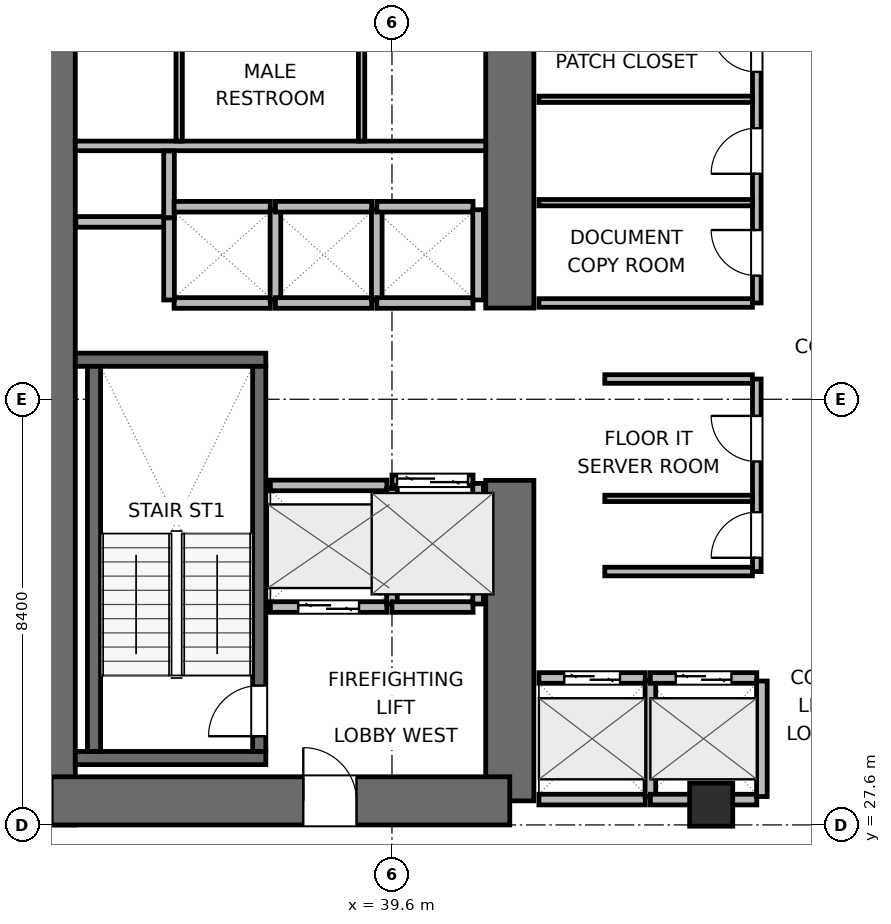
"""IFC4 building model, lengths in metres.
Left out: names, types, materials, properties, quantities, classifications, styles, units other than length and angle.
Written with IfcOpenShell. Run it as: python <this file> out.ifc"""

import sys

from ifc_helpers import new_model, si_unit, direction, frame, frame_2d, origin, origin_2d, place, context, subcontext, project, spatial, rectangle, extrude, element, fill, save


model = new_model("IFC4")
c1 = context("Model", 3, precision=1e-05, world=origin(), true_north=direction((0.0, 1.0)))
c2 = subcontext(c1, "Body", "Model", "MODEL_VIEW")
j1 = project(units=[si_unit("LENGTHUNIT", "METRE"), si_unit("PLANEANGLEUNIT", "RADIAN")], contexts=[c1])
p1 = place(None, origin())
s1 = spatial("IfcSite", under=j1, at=p1, CompositionType="ELEMENT")
p2 = place(p1, origin())
s2 = spatial("IfcBuilding", under=s1, at=p2, CompositionType="ELEMENT")
p3 = place(p2, frame((0.0, 0.0, 41.1)))
s3 = spatial("IfcBuildingStorey", under=s2, at=p3, CompositionType="ELEMENT", Elevation=41.1)
p4 = place(p3, frame((32.875, 27.6, 0.0), z_axis=(0.0, 0.0, 1.0), x_axis=(0.0, 1.0, 0.0)))
e1 = element("IfcWall", 1, at=p4, inside=s3, PredefinedType="SHEAR", context=c2, shape_type="SweptSolid", body=[
    extrude(rectangle(XDim=16.8, YDim=0.95, at=frame_2d((8.4, 0.0))), origin(), (0.0, 0.0, 1.0), 3.9),
])
p5 = place(p3, frame((41.925, 28.075, 0.0), z_axis=(0.0, 0.0, 1.0), x_axis=(0.0, 1.0, 0.0)))
e2 = element("IfcWall", 2, at=p5, inside=s3, PredefinedType="SHEAR", context=c2, shape_type="SweptSolid", body=[
    extrude(rectangle(XDim=6.325, YDim=0.95, at=frame_2d((3.163, 0.0))), origin(), (0.0, 0.0, 1.0), 3.9),
])
p6 = place(p3, frame((41.925, 37.8, 0.0), z_axis=(0.0, 0.0, 1.0), x_axis=(0.0, 1.0, 0.0)))
e3 = element("IfcWall", 3, at=p6, inside=s3, PredefinedType="SHEAR", context=c2, shape_type="SweptSolid", body=[
    extrude(rectangle(XDim=6.125, YDim=0.95, at=frame_2d((3.062, 0.0))), origin(), (0.0, 0.0, 1.0), 3.9),
])
p7 = place(p3, frame((32.875, 28.075, 0.0), z_axis=(0.0, 0.0, 1.0), x_axis=(1.0, 0.0, 0.0)))
e4 = element("IfcWall", 4, at=p7, inside=s3, PredefinedType="SHEAR", context=c2, shape_type="SweptSolid", body=[
    extrude(rectangle(XDim=9.05, YDim=0.95, at=frame_2d((4.525, 0.0))), origin(), (0.0, 0.0, 1.0), 3.9),
])
p8 = place(p7, frame((4.975, 0.0, 0.0)))
e5 = element("IfcOpeningElement", 5, at=p8, cuts=e4, PredefinedType="OPENING", context=c2, shape_type="SweptSolid", body=[
    extrude(rectangle(XDim=1.05, YDim=2.04, at=frame_2d((0.525, 1.02))), frame((0.0, 0.485, 0.0), z_axis=(0.0, -1.0, 0.0), x_axis=(1.0, 0.0, 0.0)), (0.0, 0.0, 1.0), 0.97),
])
for number, where, z_axis, x_axis in (
    (6, (33.35, 28.92, 0.0), (0.0, 0.0, 1.0), (1.0, 0.0, 0.0)),
    (7, (33.35, 36.78, 0.0), (0.0, 0.0, 1.0), (1.0, 0.0, 0.0)),
):
    element("IfcWall", number, at=place(p3, frame(where, z_axis=z_axis, x_axis=x_axis)), inside=s3, PredefinedType="SHEAR", context=c2, shape_type="SweptSolid", body=[
        extrude(rectangle(XDim=3.76, YDim=0.26, at=frame_2d((1.88, 0.0))), origin(), (0.0, 0.0, 1.0), 3.9),
    ])
p9 = place(p3, frame((33.72, 29.05, 0.0), z_axis=(0.0, 0.0, 1.0), x_axis=(0.0, 1.0, 0.0)))
e8 = element("IfcWall", 8, at=p9, inside=s3, PredefinedType="SHEAR", context=c2, shape_type="SweptSolid", body=[
    extrude(rectangle(XDim=7.6, YDim=0.26, at=frame_2d((3.8, 0.0))), origin(), (0.0, 0.0, 1.0), 3.9),
])
p10 = place(p3, frame((36.98, 29.05, 0.0), z_axis=(0.0, 0.0, 1.0), x_axis=(0.0, 1.0, 0.0)))
e9 = element("IfcWall", 9, at=p10, inside=s3, PredefinedType="SHEAR", context=c2, shape_type="SweptSolid", body=[
    extrude(rectangle(XDim=7.6, YDim=0.26, at=frame_2d((3.8, 0.0))), origin(), (0.0, 0.0, 1.0), 3.9),
])
p11 = place(p10, frame((0.3, 0.0, 0.0)))
e10 = element("IfcOpeningElement", 10, at=p11, cuts=e9, PredefinedType="OPENING", context=c2, shape_type="SweptSolid", body=[
    extrude(rectangle(XDim=1.0, YDim=2.04, at=frame_2d((0.5, 1.02))), frame((0.0, 0.14, 0.0), z_axis=(0.0, -1.0, 0.0), x_axis=(1.0, 0.0, 0.0)), (0.0, 0.0, 1.0), 0.28),
])
p12 = place(p3, frame((45.9, 28.0, 0.0), z_axis=(0.0, 0.0, 1.0), x_axis=(1.0, 0.0, 0.0)))
e11 = element("IfcColumn", 11, at=p12, inside=s3, PredefinedType="COLUMN", context=c2, shape_type="SweptSolid", body=[
    extrude(rectangle(XDim=0.85, YDim=0.85, at=origin_2d()), origin(), (0.0, 0.0, 1.0), 3.9),
])
p13 = place(p3, frame((33.35, 41.0, 0.0), z_axis=(0.0, 0.0, 1.0), x_axis=(1.0, 0.0, 0.0)))
e12 = element("IfcWall", 12, at=p13, inside=s3, PredefinedType="PLUMBINGWALL", context=c2, shape_type="SweptSolid", body=[
    extrude(rectangle(XDim=8.1, YDim=0.19, at=frame_2d((4.05, 0.0))), origin(), (0.0, 0.0, 1.0), 3.64),
])
for number, where, z_axis, x_axis in (
    (13, (35.4, 41.095, 0.0), (0.0, 0.0, 1.0), (0.0, 1.0, 0.0)),
    (14, (39.0, 41.095, 0.0), (0.0, 0.0, 1.0), (0.0, 1.0, 0.0)),
):
    element("IfcWall", number, at=place(p3, frame(where, z_axis=z_axis, x_axis=x_axis)), inside=s3, PredefinedType="PARTITIONING", context=c2, shape_type="SweptSolid", body=[
        extrude(rectangle(XDim=2.355, YDim=0.125, at=frame_2d((1.177, 0.0))), origin(), (0.0, 0.0, 1.0), 3.64),
    ])
p14 = place(p3, frame((33.36, 39.5, 0.0), z_axis=(0.0, 0.0, 1.0), x_axis=(1.0, 0.0, 0.0)))
e15 = element("IfcWall", 15, at=p14, inside=s3, PredefinedType="PARTITIONING", context=c2, shape_type="SweptSolid", body=[
    extrude(rectangle(XDim=1.86, YDim=0.21, at=frame_2d((0.93, 0.0))), origin(), (0.0, 0.0, 1.0), 3.64),
])
p15 = place(p3, frame((35.2, 39.58, 0.0), z_axis=(0.0, 0.0, 1.0), x_axis=(0.0, 1.0, 0.0)))
e16 = element("IfcWall", 16, at=p15, inside=s3, PredefinedType="PARTITIONING", context=c2, shape_type="SweptSolid", body=[
    extrude(rectangle(XDim=1.32, YDim=0.21, at=frame_2d((0.66, 0.0))), origin(), (0.0, 0.0, 1.0), 3.64),
])
p16 = place(p3, frame((37.2, 31.9, 0.0), z_axis=(0.0, 0.0, 1.0), x_axis=(1.0, 0.0, 0.0)))
e17 = element("IfcWall", 17, at=p16, inside=s3, PredefinedType="PARTITIONING", context=c2, shape_type="SweptSolid", body=[
    extrude(rectangle(XDim=2.3, YDim=0.21, at=frame_2d((1.15, 0.0))), origin(), (0.0, 0.0, 1.0), 3.64),
])
p17 = place(p16, frame((0.55, 0.0, 0.0)))
e18 = element("IfcOpeningElement", 18, at=p17, cuts=e17, PredefinedType="OPENING", context=c2, shape_type="SweptSolid", body=[
    extrude(rectangle(XDim=1.2, YDim=2.04, at=frame_2d((0.6, 1.02))), frame((0.0, 0.115, 0.0), z_axis=(0.0, -1.0, 0.0), x_axis=(1.0, 0.0, 0.0)), (0.0, 0.0, 1.0), 0.23),
])
p18 = place(p3, frame((37.2, 34.3, 0.0), z_axis=(0.0, 0.0, 1.0), x_axis=(1.0, 0.0, 0.0)))
e19 = element("IfcWall", 19, at=p18, inside=s3, PredefinedType="PARTITIONING", context=c2, shape_type="SweptSolid", body=[
    extrude(rectangle(XDim=2.3, YDim=0.21, at=frame_2d((1.15, 0.0))), origin(), (0.0, 0.0, 1.0), 3.64),
])
p19 = place(p3, frame((39.6, 31.96, 0.0), z_axis=(0.0, 0.0, 1.0), x_axis=(0.0, 1.0, 0.0)))
e20 = element("IfcWall", 20, at=p19, inside=s3, PredefinedType="PARTITIONING", context=c2, shape_type="SweptSolid", body=[
    extrude(rectangle(XDim=2.28, YDim=0.21, at=frame_2d((1.14, 0.0))), origin(), (0.0, 0.0, 1.0), 3.64),
])
p20 = place(p3, frame((39.6, 34.4, 0.0), z_axis=(0.0, 0.0, 1.0), x_axis=(1.0, 0.0, 0.0)))
e21 = element("IfcWall", 21, at=p20, inside=s3, PredefinedType="PARTITIONING", context=c2, shape_type="SweptSolid", body=[
    extrude(rectangle(XDim=1.6, YDim=0.21, at=frame_2d((0.8, 0.0))), origin(), (0.0, 0.0, 1.0), 3.64),
])
p21 = place(p20, frame((0.1, 0.0, 0.0)))
e22 = element("IfcOpeningElement", 22, at=p21, cuts=e21, PredefinedType="OPENING", context=c2, shape_type="SweptSolid", body=[
    extrude(rectangle(XDim=1.4, YDim=2.06, at=frame_2d((0.7, 1.03))), frame((0.0, 0.115, 0.0), z_axis=(0.0, -1.0, 0.0), x_axis=(1.0, 0.0, 0.0)), (0.0, 0.0, 1.0), 0.23),
])
p22 = place(p3, frame((39.6, 31.9, 0.0), z_axis=(0.0, 0.0, 1.0), x_axis=(1.0, 0.0, 0.0)))
e23 = element("IfcWall", 23, at=p22, inside=s3, PredefinedType="PARTITIONING", context=c2, shape_type="SweptSolid", body=[
    extrude(rectangle(XDim=1.6, YDim=0.21, at=frame_2d((0.8, 0.0))), origin(), (0.0, 0.0, 1.0), 3.64),
])
p23 = place(p3, frame((41.3, 31.96, 0.0), z_axis=(0.0, 0.0, 1.0), x_axis=(0.0, 1.0, 0.0)))
e24 = element("IfcWall", 24, at=p23, inside=s3, PredefinedType="PARTITIONING", context=c2, shape_type="SweptSolid", body=[
    extrude(rectangle(XDim=2.38, YDim=0.21, at=frame_2d((1.19, 0.0))), origin(), (0.0, 0.0, 1.0), 3.64),
])
p24 = place(p3, frame((42.5, 30.5, 0.0), z_axis=(0.0, 0.0, 1.0), x_axis=(1.0, 0.0, 0.0)))
e25 = element("IfcWall", 25, at=p24, inside=s3, PredefinedType="PARTITIONING", context=c2, shape_type="SweptSolid", body=[
    extrude(rectangle(XDim=2.1, YDim=0.21, at=frame_2d((1.05, 0.0))), origin(), (0.0, 0.0, 1.0), 3.64),
])
p25 = place(p24, frame((0.5, 0.0, 0.0)))
e26 = element("IfcOpeningElement", 26, at=p25, cuts=e25, PredefinedType="OPENING", context=c2, shape_type="SweptSolid", body=[
    extrude(rectangle(XDim=1.1, YDim=2.04, at=frame_2d((0.55, 1.02))), frame((0.0, 0.115, 0.0), z_axis=(0.0, -1.0, 0.0), x_axis=(1.0, 0.0, 0.0)), (0.0, 0.0, 1.0), 0.23),
])
p26 = place(p3, frame((42.5, 28.1, 0.0), z_axis=(0.0, 0.0, 1.0), x_axis=(1.0, 0.0, 0.0)))
e27 = element("IfcWall", 27, at=p26, inside=s3, PredefinedType="PARTITIONING", context=c2, shape_type="SweptSolid", body=[
    extrude(rectangle(XDim=2.1, YDim=0.21, at=frame_2d((1.05, 0.0))), origin(), (0.0, 0.0, 1.0), 2.525),
])
p27 = place(p3, frame((44.7, 28.16, 0.0), z_axis=(0.0, 0.0, 1.0), x_axis=(0.0, 1.0, 0.0)))
e28 = element("IfcWall", 28, at=p27, inside=s3, PredefinedType="PARTITIONING", context=c2, shape_type="SweptSolid", body=[
    extrude(rectangle(XDim=2.28, YDim=0.21, at=frame_2d((1.14, 0.0))), origin(), (0.0, 0.0, 1.0), 3.64),
])
p28 = place(p3, frame((44.7, 30.5, 0.0), z_axis=(0.0, 0.0, 1.0), x_axis=(1.0, 0.0, 0.0)))
e29 = element("IfcWall", 29, at=p28, inside=s3, PredefinedType="PARTITIONING", context=c2, shape_type="SweptSolid", body=[
    extrude(rectangle(XDim=2.1, YDim=0.21, at=frame_2d((1.05, 0.0))), origin(), (0.0, 0.0, 1.0), 3.64),
])
p29 = place(p28, frame((0.5, 0.0, 0.0)))
e30 = element("IfcOpeningElement", 30, at=p29, cuts=e29, PredefinedType="OPENING", context=c2, shape_type="SweptSolid", body=[
    extrude(rectangle(XDim=1.1, YDim=2.04, at=frame_2d((0.55, 1.02))), frame((0.0, 0.115, 0.0), z_axis=(0.0, -1.0, 0.0), x_axis=(1.0, 0.0, 0.0)), (0.0, 0.0, 1.0), 0.23),
])
p30 = place(p3, frame((44.7, 28.1, 0.0), z_axis=(0.0, 0.0, 1.0), x_axis=(1.0, 0.0, 0.0)))
e31 = element("IfcWall", 31, at=p30, inside=s3, PredefinedType="PARTITIONING", context=c2, shape_type="SweptSolid", body=[
    extrude(rectangle(XDim=2.1, YDim=0.21, at=frame_2d((1.05, 0.0))), origin(), (0.0, 0.0, 1.0), 2.525),
])
p31 = place(p3, frame((46.9, 28.16, 0.0), z_axis=(0.0, 0.0, 1.0), x_axis=(0.0, 1.0, 0.0)))
e32 = element("IfcWall", 32, at=p31, inside=s3, PredefinedType="PARTITIONING", context=c2, shape_type="SweptSolid", body=[
    extrude(rectangle(XDim=2.28, YDim=0.21, at=frame_2d((1.14, 0.0))), origin(), (0.0, 0.0, 1.0), 3.64),
])
for number, where, z_axis, x_axis in (
    (33, (35.3, 37.9, 0.0), (0.0, 0.0, 1.0), (1.0, 0.0, 0.0)),
    (34, (35.3, 39.8, 0.0), (0.0, 0.0, 1.0), (1.0, 0.0, 0.0)),
):
    element("IfcWall", number, at=place(p3, frame(where, z_axis=z_axis, x_axis=x_axis)), inside=s3, PredefinedType="PARTITIONING", context=c2, shape_type="SweptSolid", body=[
        extrude(rectangle(XDim=1.9, YDim=0.21, at=frame_2d((0.95, 0.0))), origin(), (0.0, 0.0, 1.0), 3.64),
    ])
p32 = place(p3, frame((35.2, 37.96, 0.0), z_axis=(0.0, 0.0, 1.0), x_axis=(0.0, 1.0, 0.0)))
e35 = element("IfcWall", 35, at=p32, inside=s3, PredefinedType="PARTITIONING", context=c2, shape_type="SweptSolid", body=[
    extrude(rectangle(XDim=1.62, YDim=0.21, at=frame_2d((0.81, 0.0))), origin(), (0.0, 0.0, 1.0), 3.64),
])
p33 = place(p3, frame((37.3, 37.96, 0.0), z_axis=(0.0, 0.0, 1.0), x_axis=(0.0, 1.0, 0.0)))
e36 = element("IfcWall", 36, at=p33, inside=s3, PredefinedType="PARTITIONING", context=c2, shape_type="SweptSolid", body=[
    extrude(rectangle(XDim=1.78, YDim=0.21, at=frame_2d((0.89, 0.0))), origin(), (0.0, 0.0, 1.0), 3.64),
])
for number, where, z_axis, x_axis in (
    (37, (37.3, 37.9, 0.0), (0.0, 0.0, 1.0), (1.0, 0.0, 0.0)),
    (38, (37.3, 39.8, 0.0), (0.0, 0.0, 1.0), (1.0, 0.0, 0.0)),
):
    element("IfcWall", number, at=place(p3, frame(where, z_axis=z_axis, x_axis=x_axis)), inside=s3, PredefinedType="PARTITIONING", context=c2, shape_type="SweptSolid", body=[
        extrude(rectangle(XDim=1.9, YDim=0.21, at=frame_2d((0.95, 0.0))), origin(), (0.0, 0.0, 1.0), 3.64),
    ])
p34 = place(p3, frame((39.3, 37.96, 0.0), z_axis=(0.0, 0.0, 1.0), x_axis=(0.0, 1.0, 0.0)))
e39 = element("IfcWall", 39, at=p34, inside=s3, PredefinedType="PARTITIONING", context=c2, shape_type="SweptSolid", body=[
    extrude(rectangle(XDim=1.78, YDim=0.21, at=frame_2d((0.89, 0.0))), origin(), (0.0, 0.0, 1.0), 3.64),
])
for number, where, z_axis, x_axis in (
    (40, (39.3, 37.9, 0.0), (0.0, 0.0, 1.0), (1.0, 0.0, 0.0)),
    (41, (39.3, 39.8, 0.0), (0.0, 0.0, 1.0), (1.0, 0.0, 0.0)),
):
    element("IfcWall", number, at=place(p3, frame(where, z_axis=z_axis, x_axis=x_axis)), inside=s3, PredefinedType="PARTITIONING", context=c2, shape_type="SweptSolid", body=[
        extrude(rectangle(XDim=1.9, YDim=0.21, at=frame_2d((0.95, 0.0))), origin(), (0.0, 0.0, 1.0), 3.64),
    ])
p35 = place(p3, frame((41.3, 37.96, 0.0), z_axis=(0.0, 0.0, 1.0), x_axis=(0.0, 1.0, 0.0)))
e42 = element("IfcWall", 42, at=p35, inside=s3, PredefinedType="PARTITIONING", context=c2, shape_type="SweptSolid", body=[
    extrude(rectangle(XDim=1.78, YDim=0.21, at=frame_2d((0.89, 0.0))), origin(), (0.0, 0.0, 1.0), 3.64),
])
p36 = place(p3, frame((46.8, 32.6, 0.0), z_axis=(0.0, 0.0, 1.0), x_axis=(0.0, 1.0, 0.0)))
e43 = element("IfcWall", 43, at=p36, inside=s3, PredefinedType="PARTITIONING", context=c2, shape_type="SweptSolid", body=[
    extrude(rectangle(XDim=3.8, YDim=0.17, at=frame_2d((1.9, 0.0))), origin(), (0.0, 0.0, 1.0), 3.64),
])
p37 = place(p36, frame((0.272, 0.0, 0.0)))
e44 = element("IfcOpeningElement", 44, at=p37, cuts=e43, PredefinedType="OPENING", context=c2, shape_type="SweptSolid", body=[
    extrude(rectangle(XDim=0.9, YDim=2.02, at=frame_2d((0.45, 1.01))), frame((0.0, 0.095, 0.0), z_axis=(0.0, -1.0, 0.0), x_axis=(1.0, 0.0, 0.0)), (0.0, 0.0, 1.0), 0.19),
])
p38 = place(p36, frame((2.172, 0.0, 0.0)))
e45 = element("IfcOpeningElement", 45, at=p38, cuts=e43, PredefinedType="OPENING", context=c2, shape_type="SweptSolid", body=[
    extrude(rectangle(XDim=0.9, YDim=2.02, at=frame_2d((0.45, 1.01))), frame((0.0, 0.095, 0.0), z_axis=(0.0, -1.0, 0.0), x_axis=(1.0, 0.0, 0.0)), (0.0, 0.0, 1.0), 0.19),
])
for number, where, z_axis, x_axis in (
    (46, (43.8, 32.6, 0.0), (0.0, 0.0, 1.0), (1.0, 0.0, 0.0)),
    (47, (43.8, 36.4, 0.0), (0.0, 0.0, 1.0), (1.0, 0.0, 0.0)),
):
    element("IfcWall", number, at=place(p3, frame(where, z_axis=z_axis, x_axis=x_axis)), inside=s3, PredefinedType="PARTITIONING", context=c2, shape_type="SweptSolid", body=[
        extrude(rectangle(XDim=2.913, YDim=0.17, at=frame_2d((1.457, 0.0))), origin(), (0.0, 0.0, 1.0), 3.64),
    ])
p39 = place(p3, frame((43.8, 34.044, 0.0), z_axis=(0.0, 0.0, 1.0), x_axis=(1.0, 0.0, 0.0)))
e48 = element("IfcWall", 48, at=p39, inside=s3, PredefinedType="PARTITIONING", context=c2, shape_type="SweptSolid", body=[
    extrude(rectangle(XDim=2.913, YDim=0.125, at=frame_2d((1.457, 0.0))), origin(), (0.0, 0.0, 1.0), 3.64),
])
p40 = place(p3, frame((46.8, 37.9, 0.0), z_axis=(0.0, 0.0, 1.0), x_axis=(0.0, 1.0, 0.0)))
e49 = element("IfcWall", 49, at=p40, inside=s3, PredefinedType="PARTITIONING", context=c2, shape_type="SweptSolid", body=[
    extrude(rectangle(XDim=6.0, YDim=0.17, at=frame_2d((3.0, 0.0))), origin(), (0.0, 0.0, 1.0), 3.64),
])
p41 = place(p40, frame((0.54, 0.0, 0.0)))
e50 = element("IfcOpeningElement", 50, at=p41, cuts=e49, PredefinedType="OPENING", context=c2, shape_type="SweptSolid", body=[
    extrude(rectangle(XDim=0.9, YDim=2.02, at=frame_2d((0.45, 1.01))), frame((0.0, 0.095, 0.0), z_axis=(0.0, -1.0, 0.0), x_axis=(1.0, 0.0, 0.0)), (0.0, 0.0, 1.0), 0.19),
])
p42 = place(p40, frame((2.55, 0.0, 0.0)))
e51 = element("IfcOpeningElement", 51, at=p42, cuts=e49, PredefinedType="OPENING", context=c2, shape_type="SweptSolid", body=[
    extrude(rectangle(XDim=0.9, YDim=2.02, at=frame_2d((0.45, 1.01))), frame((0.0, 0.095, 0.0), z_axis=(0.0, -1.0, 0.0), x_axis=(1.0, 0.0, 0.0)), (0.0, 0.0, 1.0), 0.19),
])
p43 = place(p40, frame((4.56, 0.0, 0.0)))
e52 = element("IfcOpeningElement", 52, at=p43, cuts=e49, PredefinedType="OPENING", context=c2, shape_type="SweptSolid", body=[
    extrude(rectangle(XDim=0.9, YDim=2.02, at=frame_2d((0.45, 1.01))), frame((0.0, 0.095, 0.0), z_axis=(0.0, -1.0, 0.0), x_axis=(1.0, 0.0, 0.0)), (0.0, 0.0, 1.0), 0.19),
])
p44 = place(p3, frame((42.5, 37.9, 0.0), z_axis=(0.0, 0.0, 1.0), x_axis=(1.0, 0.0, 0.0)))
e53 = element("IfcWall", 53, at=p44, inside=s3, PredefinedType="PARTITIONING", context=c2, shape_type="SweptSolid", body=[
    extrude(rectangle(XDim=4.213, YDim=0.17, at=frame_2d((2.106, 0.0))), origin(), (0.0, 0.0, 1.0), 3.64),
])
for number, where, z_axis, x_axis in (
    (54, (42.5, 39.88, 0.0), (0.0, 0.0, 1.0), (1.0, 0.0, 0.0)),
    (55, (42.5, 41.92, 0.0), (0.0, 0.0, 1.0), (1.0, 0.0, 0.0)),
):
    element("IfcWall", number, at=place(p3, frame(where, z_axis=z_axis, x_axis=x_axis)), inside=s3, PredefinedType="PARTITIONING", context=c2, shape_type="SweptSolid", body=[
        extrude(rectangle(XDim=4.213, YDim=0.125, at=frame_2d((2.106, 0.0))), origin(), (0.0, 0.0, 1.0), 3.64),
    ])
p45 = place(p11, origin())
e56 = element("IfcDoor", 56, at=p45, inside=s3, OperationType="SINGLE_SWING_LEFT", PredefinedType="DOOR", context=c2, shape_type="SweptSolid", body=[
    extrude(rectangle(XDim=1.0, YDim=2.04, at=frame_2d((0.5, 1.02))), frame((0.0, 0.025, 0.0), z_axis=(0.0, -1.0, 0.0), x_axis=(1.0, 0.0, 0.0)), (0.0, 0.0, 1.0), 0.05),
])
fill(e10, e56)
p46 = place(p17, origin())
e57 = element("IfcDoor", 57, at=p46, inside=s3, OperationType="DOUBLE_DOOR_SLIDING", PredefinedType="DOOR", context=c2, shape_type="SweptSolid", body=[
    extrude(rectangle(XDim=1.2, YDim=2.04, at=frame_2d((0.6, 1.02))), frame((0.0, 0.025, 0.0), z_axis=(0.0, -1.0, 0.0), x_axis=(1.0, 0.0, 0.0)), (0.0, 0.0, 1.0), 0.05),
])
fill(e18, e57)
p47 = place(p21, origin())
e58 = element("IfcDoor", 58, at=p47, inside=s3, OperationType="DOUBLE_DOOR_SLIDING", PredefinedType="DOOR", context=c2, shape_type="SweptSolid", body=[
    extrude(rectangle(XDim=1.4, YDim=2.06, at=frame_2d((0.7, 1.03))), frame((0.0, 0.025, 0.0), z_axis=(0.0, -1.0, 0.0), x_axis=(1.0, 0.0, 0.0)), (0.0, 0.0, 1.0), 0.05),
])
fill(e22, e58)
p48 = place(p25, origin())
e59 = element("IfcDoor", 59, at=p48, inside=s3, OperationType="DOUBLE_DOOR_SLIDING", PredefinedType="DOOR", context=c2, shape_type="SweptSolid", body=[
    extrude(rectangle(XDim=1.1, YDim=2.04, at=frame_2d((0.55, 1.02))), frame((0.0, 0.025, 0.0), z_axis=(0.0, -1.0, 0.0), x_axis=(1.0, 0.0, 0.0)), (0.0, 0.0, 1.0), 0.05),
])
fill(e26, e59)
p49 = place(p29, origin())
e60 = element("IfcDoor", 60, at=p49, inside=s3, OperationType="DOUBLE_DOOR_SLIDING", PredefinedType="DOOR", context=c2, shape_type="SweptSolid", body=[
    extrude(rectangle(XDim=1.1, YDim=2.04, at=frame_2d((0.55, 1.02))), frame((0.0, 0.025, 0.0), z_axis=(0.0, -1.0, 0.0), x_axis=(1.0, 0.0, 0.0)), (0.0, 0.0, 1.0), 0.05),
])
fill(e30, e60)
p50 = place(p8, origin())
e61 = element("IfcDoor", 61, at=p50, inside=s3, OperationType="SINGLE_SWING_LEFT", PredefinedType="DOOR", context=c2, shape_type="SweptSolid", body=[
    extrude(rectangle(XDim=1.05, YDim=2.04, at=frame_2d((0.525, 1.02))), frame((0.0, 0.025, 0.0), z_axis=(0.0, -1.0, 0.0), x_axis=(1.0, 0.0, 0.0)), (0.0, 0.0, 1.0), 0.05),
])
fill(e5, e61)
p51 = place(p37, origin())
e62 = element("IfcDoor", 62, at=p51, inside=s3, OperationType="SINGLE_SWING_LEFT", PredefinedType="DOOR", context=c2, shape_type="SweptSolid", body=[
    extrude(rectangle(XDim=0.9, YDim=2.02, at=frame_2d((0.45, 1.01))), frame((0.0, 0.025, 0.0), z_axis=(0.0, -1.0, 0.0), x_axis=(1.0, 0.0, 0.0)), (0.0, 0.0, 1.0), 0.05),
])
fill(e44, e62)
p52 = place(p38, origin())
e63 = element("IfcDoor", 63, at=p52, inside=s3, OperationType="SINGLE_SWING_RIGHT", PredefinedType="DOOR", context=c2, shape_type="SweptSolid", body=[
    extrude(rectangle(XDim=0.9, YDim=2.02, at=frame_2d((0.45, 1.01))), frame((0.0, 0.025, 0.0), z_axis=(0.0, -1.0, 0.0), x_axis=(1.0, 0.0, 0.0)), (0.0, 0.0, 1.0), 0.05),
])
fill(e45, e63)
p53 = place(p41, origin())
e64 = element("IfcDoor", 64, at=p53, inside=s3, OperationType="SINGLE_SWING_RIGHT", PredefinedType="DOOR", context=c2, shape_type="SweptSolid", body=[
    extrude(rectangle(XDim=0.9, YDim=2.02, at=frame_2d((0.45, 1.01))), frame((0.0, 0.025, 0.0), z_axis=(0.0, -1.0, 0.0), x_axis=(1.0, 0.0, 0.0)), (0.0, 0.0, 1.0), 0.05),
])
fill(e50, e64)
p54 = place(p42, origin())
e65 = element("IfcDoor", 65, at=p54, inside=s3, OperationType="SINGLE_SWING_LEFT", PredefinedType="DOOR", context=c2, shape_type="SweptSolid", body=[
    extrude(rectangle(XDim=0.9, YDim=2.02, at=frame_2d((0.45, 1.01))), frame((0.0, 0.025, 0.0), z_axis=(0.0, -1.0, 0.0), x_axis=(1.0, 0.0, 0.0)), (0.0, 0.0, 1.0), 0.05),
])
fill(e51, e65)
p55 = place(p43, origin())
e66 = element("IfcDoor", 66, at=p55, inside=s3, OperationType="SINGLE_SWING_RIGHT", PredefinedType="DOOR", context=c2, shape_type="SweptSolid", body=[
    extrude(rectangle(XDim=0.9, YDim=2.02, at=frame_2d((0.45, 1.01))), frame((0.0, 0.025, 0.0), z_axis=(0.0, -1.0, 0.0), x_axis=(1.0, 0.0, 0.0)), (0.0, 0.0, 1.0), 0.05),
])
fill(e52, e66)
save(model, sys.argv[1])
